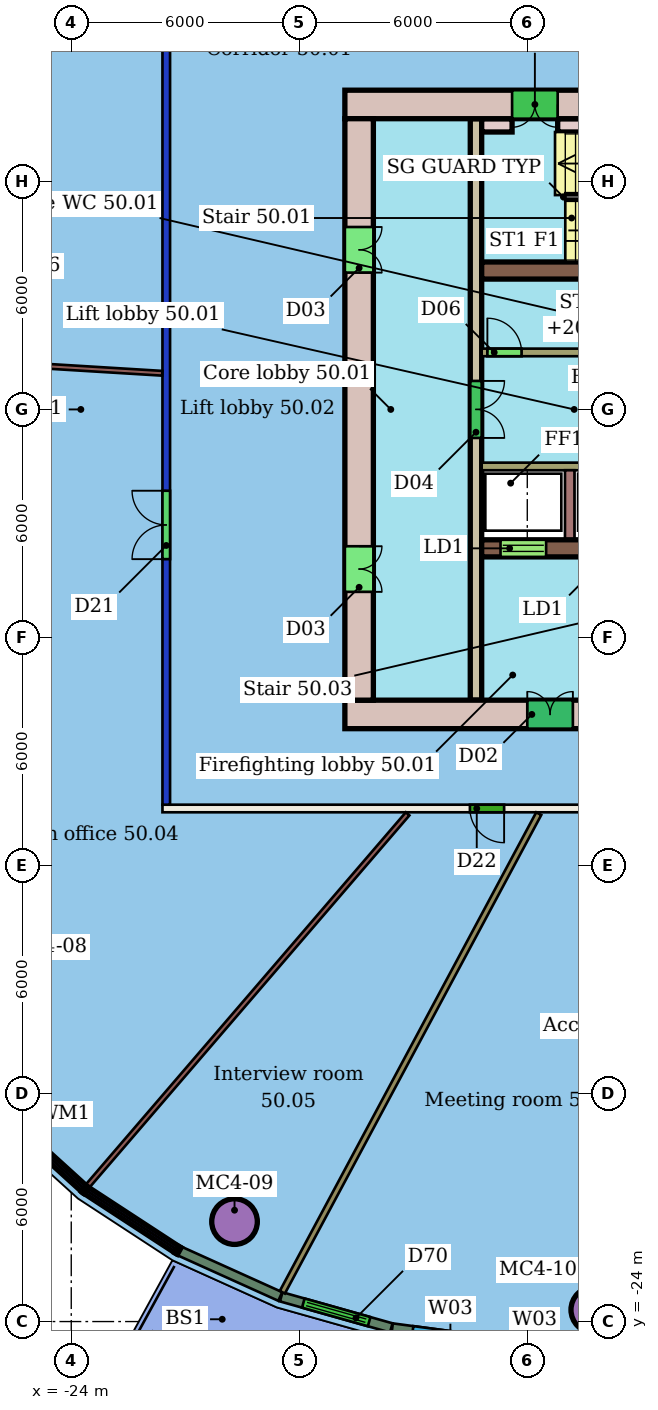
"""IFC4 building model, lengths in metres.
Left out: names, types, materials, properties, quantities, classifications, styles, units other than length and angle.
Written with IfcOpenShell. Run it as: python <this file> out.ifc"""

import sys

from ifc_helpers import new_model, si_unit, direction, frame, frame_2d, origin, origin_2d, place, context, subcontext, project, spatial, rectangle, hollow_circle, extrude, element, fill, save


model = new_model("IFC4")
c1 = context("Model", 3, precision=1e-05, world=origin(), true_north=direction((0.0, 1.0)))
c2 = subcontext(c1, "Body", "Model", "MODEL_VIEW")
j1 = project(units=[si_unit("LENGTHUNIT", "METRE"), si_unit("PLANEANGLEUNIT", "RADIAN")], contexts=[c1])
p1 = place(None, origin())
s1 = spatial("IfcSite", under=j1, at=p1, CompositionType="ELEMENT")
p2 = place(p1, origin())
s2 = spatial("IfcBuilding", under=s1, at=p2, CompositionType="ELEMENT")
p3 = place(p2, frame((0.0, 0.0, 206.5)))
s3 = spatial("IfcBuildingStorey", under=s2, at=p3, CompositionType="ELEMENT", Elevation=206.5)
for number, where, z_axis, x_axis in (
    (1, (-19.704, -21.37, 0.0), (0.0, 0.0, 1.0), (1.0, 0.0, 0.0)),
    (2, (-10.25, -23.691, 0.0), (0.0, 0.0, 1.0), (1.0, 0.0, 0.0)),
):
    element("IfcColumn", number, at=place(p3, frame(where, z_axis=z_axis, x_axis=x_axis)), inside=s3, PredefinedType="COLUMN", context=c2, shape_type="SweptSolid", body=[
        extrude(hollow_circle(Radius=0.6, WallThickness=0.045, at=origin_2d()), origin(), (0.0, 0.0, 1.0), 3.45),
    ])
p4 = place(p3, frame((9.6, -10.5, 0.0), z_axis=(0.0, 0.0, 1.0), x_axis=(-1.0, 0.0, 0.0)))
e3 = element("IfcWall", 3, at=p4, inside=s3, PredefinedType="PARTITIONING", context=c2, shape_type="SweptSolid", body=[
    extrude(rectangle(XDim=31.2, YDim=0.2, at=frame_2d((15.6, 0.0))), origin(), (0.0, 0.0, 1.0), 3.45),
])
p5 = place(p4, frame((22.21, 0.0, 0.0)))
e4 = element("IfcOpeningElement", 4, at=p5, cuts=e3, PredefinedType="OPENING", context=c2, shape_type="SweptSolid", body=[
    extrude(rectangle(XDim=0.9, YDim=2.1, at=frame_2d((0.45, 1.05))), frame((0.0, 0.11, 0.0), z_axis=(0.0, -1.0, 0.0), x_axis=(1.0, 0.0, 0.0)), (0.0, 0.0, 1.0), 0.22),
])
p6 = place(p4, frame((19.173, 0.0, 0.0)))
e5 = element("IfcOpeningElement", 5, at=p6, cuts=e3, PredefinedType="OPENING", context=c2, shape_type="SweptSolid", body=[
    extrude(rectangle(XDim=0.9, YDim=2.1, at=frame_2d((0.45, 1.05))), frame((0.0, 0.11, 0.0), z_axis=(0.0, -1.0, 0.0), x_axis=(1.0, 0.0, 0.0)), (0.0, 0.0, 1.0), 0.22),
])
p7 = place(p4, frame((8.72, 0.0, 0.0)))
e6 = element("IfcOpeningElement", 6, at=p7, cuts=e3, PredefinedType="OPENING", context=c2, shape_type="SweptSolid", body=[
    extrude(rectangle(XDim=1.8, YDim=2.4, at=frame_2d((0.9, 1.2))), frame((0.0, 0.11, 0.0), z_axis=(0.0, -1.0, 0.0), x_axis=(1.0, 0.0, 0.0)), (0.0, 0.0, 1.0), 0.22),
])
p8 = place(p4, frame((3.052, 0.0, 0.0)))
e7 = element("IfcOpeningElement", 7, at=p8, cuts=e3, PredefinedType="OPENING", context=c2, shape_type="SweptSolid", body=[
    extrude(rectangle(XDim=1.0, YDim=2.4, at=frame_2d((0.5, 1.2))), frame((0.0, 0.11, 0.0), z_axis=(0.0, -1.0, 0.0), x_axis=(1.0, 0.0, 0.0)), (0.0, 0.0, 1.0), 0.22),
])
p9 = place(p3, frame((-21.5, -10.4, 0.0), z_axis=(0.0, 0.0, 1.0), x_axis=(0.0, 1.0, 0.0)))
e8 = element("IfcWall", 8, at=p9, inside=s3, PredefinedType="PARTITIONING", context=c2, shape_type="SweptSolid", body=[
    extrude(rectangle(XDim=20.8, YDim=0.2, at=frame_2d((10.4, 0.0))), origin(), (0.0, 0.0, 1.0), 3.05),
])
p10 = place(p9, frame((6.461, 0.0, 0.0)))
e9 = element("IfcOpeningElement", 9, at=p10, cuts=e8, PredefinedType="OPENING", context=c2, shape_type="SweptSolid", body=[
    extrude(rectangle(XDim=1.8, YDim=2.1, at=frame_2d((0.9, 1.05))), frame((0.0, 0.11, 0.0), z_axis=(0.0, -1.0, 0.0), x_axis=(1.0, 0.0, 0.0)), (0.0, 0.0, 1.0), 0.22),
])
p11 = place(p3, frame((-29.979, 1.462, 0.0), z_axis=(0.0, 0.0, 1.0), x_axis=(0.998147297747, -0.060843832889, 0.0)))
e10 = element("IfcWall", 10, at=p11, inside=s3, PredefinedType="PARTITIONING", context=c2, shape_type="SweptSolid", body=[
    extrude(rectangle(XDim=8.39, YDim=0.125, at=frame_2d((4.195, 0.0))), origin(), (0.0, 0.0, 1.0), 3.45),
])
p12 = place(p3, frame((-23.564, -20.427, 0.0), z_axis=(0.0, 0.0, 1.0), x_axis=(0.651952710233, 0.758259628109, 0.0)))
e11 = element("IfcWall", 11, at=p12, inside=s3, PredefinedType="PARTITIONING", context=c2, shape_type="SweptSolid", body=[
    extrude(rectangle(XDim=12.907, YDim=0.125, at=frame_2d((6.453, 0.0))), origin(), (0.0, 0.0, 1.0), 3.45),
])
p13 = place(p3, frame((-18.445, -23.228, 0.0), z_axis=(0.0, 0.0, 1.0), x_axis=(0.472259350385, 0.881459645119, 0.0)))
e12 = element("IfcWall", 12, at=p13, inside=s3, PredefinedType="PARTITIONING", context=c2, shape_type="SweptSolid", body=[
    extrude(rectangle(XDim=14.286, YDim=0.15, at=frame_2d((7.143, 0.0))), origin(), (0.0, 0.0, 1.0), 3.45),
])
p14 = place(p3, frame((-21.144, -22.147, 0.0), z_axis=(0.0, 0.0, 1.0), x_axis=(0.91141845893, -0.411480731897, 0.0)))
e13 = element("IfcWall", 13, at=p14, inside=s3, PredefinedType="SOLIDWALL", context=c2, shape_type="SweptSolid", body=[
    extrude(rectangle(XDim=2.901, YDim=0.25, at=frame_2d((1.45, 0.0))), origin(), (0.0, 0.0, 1.0), 3.1),
])
p15 = place(p3, frame((-18.475, -23.349, 0.0), z_axis=(0.0, 0.0, 1.0), x_axis=(0.962400743331, -0.271633593717, 0.0)))
e14 = element("IfcWall", 14, at=p15, inside=s3, PredefinedType="SOLIDWALL", context=c2, shape_type="SweptSolid", body=[
    extrude(rectangle(XDim=3.009, YDim=0.25, at=frame_2d((1.504, 0.0))), origin(), (0.0, 0.0, 1.0), 3.1),
])
p16 = place(p15, frame((0.604, 0.0, 0.0)))
e15 = element("IfcOpeningElement", 15, at=p16, cuts=e14, PredefinedType="OPENING", context=c2, shape_type="SweptSolid", body=[
    extrude(rectangle(XDim=1.8, YDim=2.4, at=frame_2d((0.9, 1.2))), frame((0.0, 0.135, 0.0), z_axis=(0.0, -1.0, 0.0), x_axis=(1.0, 0.0, 0.0)), (0.0, 0.0, 1.0), 0.27),
])
p17 = place(p3, frame((-15.554, -24.172, 0.0), z_axis=(0.0, 0.0, 1.0), x_axis=(0.99120717839, -0.132319044388, 0.0)))
e16 = element("IfcWall", 16, at=p17, inside=s3, PredefinedType="SOLIDWALL", context=c2, shape_type="SweptSolid", body=[
    extrude(rectangle(XDim=3.089, YDim=0.25, at=frame_2d((1.544, 0.0))), origin(), (0.0, 0.0, 1.0), 3.1),
])
p18 = place(p17, frame((0.544, 0.0, 0.9)))
e17 = element("IfcOpeningElement", 17, at=p18, cuts=e16, PredefinedType="OPENING", context=c2, shape_type="SweptSolid", body=[
    extrude(rectangle(XDim=2.0, YDim=2.1, at=frame_2d((1.0, 1.05))), frame((0.0, 0.135, 0.0), z_axis=(0.0, -1.0, 0.0), x_axis=(1.0, 0.0, 0.0)), (0.0, 0.0, 1.0), 0.27),
])
p19 = place(p3, frame((-6.0, 8.025, 0.0), z_axis=(0.0, 0.0, 1.0), x_axis=(-1.0, 0.0, 0.0)))
e18 = element("IfcWall", 18, at=p19, inside=s3, PredefinedType="SHEAR", context=c2, shape_type="SweptSolid", body=[
    extrude(rectangle(XDim=10.8, YDim=0.75, at=frame_2d((5.4, 0.0))), origin(), (0.0, 0.0, 1.0), 3.3),
])
p20 = place(p19, frame((5.2, 0.0, 0.0)))
e19 = element("IfcOpeningElement", 19, at=p20, cuts=e18, PredefinedType="OPENING", context=c2, shape_type="SweptSolid", body=[
    extrude(rectangle(XDim=1.2, YDim=2.1, at=frame_2d((0.6, 1.05))), frame((0.0, 0.385, 0.0), z_axis=(0.0, -1.0, 0.0), x_axis=(1.0, 0.0, 0.0)), (0.0, 0.0, 1.0), 0.77),
])
p21 = place(p3, frame((-16.8, -8.025, 0.0), z_axis=(0.0, 0.0, 1.0), x_axis=(1.0, 0.0, 0.0)))
e20 = element("IfcWall", 20, at=p21, inside=s3, PredefinedType="SHEAR", context=c2, shape_type="SweptSolid", body=[
    extrude(rectangle(XDim=21.6, YDim=0.75, at=frame_2d((10.8, 0.0))), origin(), (0.0, 0.0, 1.0), 3.3),
])
p22 = place(p21, frame((4.8, 0.0, 0.0)))
e21 = element("IfcOpeningElement", 21, at=p22, cuts=e20, PredefinedType="OPENING", context=c2, shape_type="SweptSolid", body=[
    extrude(rectangle(XDim=1.2, YDim=2.1, at=frame_2d((0.6, 1.05))), frame((0.0, 0.385, 0.0), z_axis=(0.0, -1.0, 0.0), x_axis=(1.0, 0.0, 0.0)), (0.0, 0.0, 1.0), 0.77),
])
p23 = place(p3, frame((-16.425, 7.65, 0.0), z_axis=(0.0, 0.0, 1.0), x_axis=(0.0, -1.0, 0.0)))
e22 = element("IfcWall", 22, at=p23, inside=s3, PredefinedType="SHEAR", context=c2, shape_type="SweptSolid", body=[
    extrude(rectangle(XDim=15.3, YDim=0.75, at=frame_2d((7.65, 0.0))), origin(), (0.0, 0.0, 1.0), 3.3),
])
p24 = place(p23, frame((11.25, 0.0, 0.0)))
e23 = element("IfcOpeningElement", 23, at=p24, cuts=e22, PredefinedType="OPENING", context=c2, shape_type="SweptSolid", body=[
    extrude(rectangle(XDim=1.2, YDim=2.1, at=frame_2d((0.6, 1.05))), frame((0.0, 0.385, 0.0), z_axis=(0.0, -1.0, 0.0), x_axis=(1.0, 0.0, 0.0)), (0.0, 0.0, 1.0), 0.77),
])
p25 = place(p23, frame((2.85, 0.0, 0.0)))
e24 = element("IfcOpeningElement", 24, at=p25, cuts=e22, PredefinedType="OPENING", context=c2, shape_type="SweptSolid", body=[
    extrude(rectangle(XDim=1.2, YDim=2.1, at=frame_2d((0.6, 1.05))), frame((0.0, 0.385, 0.0), z_axis=(0.0, -1.0, 0.0), x_axis=(1.0, 0.0, 0.0)), (0.0, 0.0, 1.0), 0.77),
])
p26 = place(p3, frame((-13.2, 3.655, 0.0), z_axis=(0.0, 0.0, 1.0), x_axis=(1.0, 0.0, 0.0)))
e25 = element("IfcWall", 25, at=p26, inside=s3, PredefinedType="SHEAR", context=c2, shape_type="SweptSolid", body=[
    extrude(rectangle(XDim=7.2, YDim=0.45, at=frame_2d((3.6, 0.0))), origin(), (0.0, 0.0, 1.0), 3.3),
])
p27 = place(p3, frame((-13.2, -3.655, 0.0), z_axis=(0.0, 0.0, 1.0), x_axis=(1.0, 0.0, 0.0)))
e26 = element("IfcWall", 26, at=p27, inside=s3, PredefinedType="SHEAR", context=c2, shape_type="SweptSolid", body=[
    extrude(rectangle(XDim=7.2, YDim=0.45, at=frame_2d((3.6, 0.0))), origin(), (0.0, 0.0, 1.0), 3.3),
])
p28 = place(p27, frame((0.496, 0.0, 0.0)))
e27 = element("IfcOpeningElement", 27, at=p28, cuts=e26, PredefinedType="OPENING", context=c2, shape_type="SweptSolid", body=[
    extrude(rectangle(XDim=1.2, YDim=2.1, at=frame_2d((0.6, 1.05))), frame((0.0, 0.235, 0.0), z_axis=(0.0, -1.0, 0.0), x_axis=(1.0, 0.0, 0.0)), (0.0, 0.0, 1.0), 0.47),
])
p29 = place(p27, frame((2.938, 0.0, 0.0)))
e28 = element("IfcOpeningElement", 28, at=p29, cuts=e26, PredefinedType="OPENING", context=c2, shape_type="SweptSolid", body=[
    extrude(rectangle(XDim=1.2, YDim=2.1, at=frame_2d((0.6, 1.05))), frame((0.0, 0.235, 0.0), z_axis=(0.0, -1.0, 0.0), x_axis=(1.0, 0.0, 0.0)), (0.0, 0.0, 1.0), 0.47),
])
p30 = place(p3, frame((-13.35, 7.65, 0.0), z_axis=(0.0, 0.0, 1.0), x_axis=(0.0, -1.0, 0.0)))
e29 = element("IfcWall", 29, at=p30, inside=s3, PredefinedType="SHEAR", context=c2, shape_type="SweptSolid", body=[
    extrude(rectangle(XDim=15.3, YDim=0.3, at=frame_2d((7.65, 0.0))), origin(), (0.0, 0.0, 1.0), 3.3),
])
p31 = place(p30, frame((6.9, 0.0, 0.0)))
e30 = element("IfcOpeningElement", 30, at=p31, cuts=e29, PredefinedType="OPENING", context=c2, shape_type="SweptSolid", body=[
    extrude(rectangle(XDim=1.5, YDim=2.1, at=frame_2d((0.75, 1.05))), frame((0.0, 0.16, 0.0), z_axis=(0.0, -1.0, 0.0), x_axis=(1.0, 0.0, 0.0)), (0.0, 0.0, 1.0), 0.32),
])
p32 = place(p3, frame((-13.2, 1.5, 0.0), z_axis=(0.0, 0.0, 1.0), x_axis=(1.0, 0.0, 0.0)))
e31 = element("IfcWall", 31, at=p32, inside=s3, PredefinedType="SHEAR", context=c2, shape_type="SweptSolid", body=[
    extrude(rectangle(XDim=14.4, YDim=0.2, at=frame_2d((7.2, 0.0))), origin(), (0.0, 0.0, 1.0), 3.3),
])
p33 = place(p32, frame((10.312, 0.0, 0.0)))
e32 = element("IfcOpeningElement", 32, at=p33, cuts=e31, PredefinedType="OPENING", context=c2, shape_type="SweptSolid", body=[
    extrude(rectangle(XDim=1.1, YDim=2.1, at=frame_2d((0.55, 1.05))), frame((0.0, 0.11, 0.0), z_axis=(0.0, -1.0, 0.0), x_axis=(1.0, 0.0, 0.0)), (0.0, 0.0, 1.0), 0.22),
])
p34 = place(p32, frame((12.754, 0.0, 0.0)))
e33 = element("IfcOpeningElement", 33, at=p34, cuts=e31, PredefinedType="OPENING", context=c2, shape_type="SweptSolid", body=[
    extrude(rectangle(XDim=1.1, YDim=2.1, at=frame_2d((0.55, 1.05))), frame((0.0, 0.11, 0.0), z_axis=(0.0, -1.0, 0.0), x_axis=(1.0, 0.0, 0.0)), (0.0, 0.0, 1.0), 0.22),
])
p35 = place(p32, frame((0.15, 0.0, 0.0)))
e34 = element("IfcOpeningElement", 34, at=p35, cuts=e31, PredefinedType="OPENING", context=c2, shape_type="SweptSolid", body=[
    extrude(rectangle(XDim=0.9, YDim=2.1, at=frame_2d((0.45, 1.05))), frame((0.0, 0.11, 0.0), z_axis=(0.0, -1.0, 0.0), x_axis=(1.0, 0.0, 0.0)), (0.0, 0.0, 1.0), 0.22),
])
p36 = place(p32, frame((4.983, 0.0, 0.0)))
e35 = element("IfcOpeningElement", 35, at=p36, cuts=e31, PredefinedType="OPENING", context=c2, shape_type="SweptSolid", body=[
    extrude(rectangle(XDim=0.9, YDim=2.1, at=frame_2d((0.45, 1.05))), frame((0.0, 0.11, 0.0), z_axis=(0.0, -1.0, 0.0), x_axis=(1.0, 0.0, 0.0)), (0.0, 0.0, 1.0), 0.22),
])
p37 = place(p3, frame((1.2, -1.5, 0.0), z_axis=(0.0, 0.0, 1.0), x_axis=(-1.0, 0.0, 0.0)))
e36 = element("IfcWall", 36, at=p37, inside=s3, PredefinedType="SHEAR", context=c2, shape_type="SweptSolid", body=[
    extrude(rectangle(XDim=14.4, YDim=0.2, at=frame_2d((7.2, 0.0))), origin(), (0.0, 0.0, 1.0), 3.3),
])
p38 = place(p37, frame((7.821, 0.0, 0.0)))
e37 = element("IfcOpeningElement", 37, at=p38, cuts=e36, PredefinedType="OPENING", context=c2, shape_type="SweptSolid", body=[
    extrude(rectangle(XDim=1.2, YDim=2.1, at=frame_2d((0.6, 1.05))), frame((0.0, 0.11, 0.0), z_axis=(0.0, -1.0, 0.0), x_axis=(1.0, 0.0, 0.0)), (0.0, 0.0, 1.0), 0.22),
])
p39 = place(p37, frame((0.546, 0.0, 0.0)))
e38 = element("IfcOpeningElement", 38, at=p39, cuts=e36, PredefinedType="OPENING", context=c2, shape_type="SweptSolid", body=[
    extrude(rectangle(XDim=1.1, YDim=2.1, at=frame_2d((0.55, 1.05))), frame((0.0, 0.11, 0.0), z_axis=(0.0, -1.0, 0.0), x_axis=(1.0, 0.0, 0.0)), (0.0, 0.0, 1.0), 0.22),
])
p40 = place(p37, frame((4.983, 0.0, 0.0)))
e39 = element("IfcOpeningElement", 39, at=p40, cuts=e36, PredefinedType="OPENING", context=c2, shape_type="SweptSolid", body=[
    extrude(rectangle(XDim=1.0, YDim=2.1, at=frame_2d((0.5, 1.05))), frame((0.0, 0.11, 0.0), z_axis=(0.0, -1.0, 0.0), x_axis=(1.0, 0.0, 0.0)), (0.0, 0.0, 1.0), 0.22),
])
p41 = place(p37, frame((2.592, 0.0, 0.0)))
e40 = element("IfcOpeningElement", 40, at=p41, cuts=e36, PredefinedType="OPENING", context=c2, shape_type="SweptSolid", body=[
    extrude(rectangle(XDim=1.0, YDim=2.1, at=frame_2d((0.5, 1.05))), frame((0.0, 0.11, 0.0), z_axis=(0.0, -1.0, 0.0), x_axis=(1.0, 0.0, 0.0)), (0.0, 0.0, 1.0), 0.22),
])
p42 = place(p3, frame((-13.2, 7.475, 0.0), z_axis=(0.0, 0.0, 1.0), x_axis=(1.0, 0.0, 0.0)))
e41 = element("IfcWall", 41, at=p42, inside=s3, PredefinedType="SHEAR", context=c2, shape_type="SweptSolid", body=[
    extrude(rectangle(XDim=0.8, YDim=0.35, at=frame_2d((0.4, 0.0))), origin(), (0.0, 0.0, 1.0), 3.3),
])
p43 = place(p3, frame((-11.2, 7.475, 0.0), z_axis=(0.0, 0.0, 1.0), x_axis=(1.0, 0.0, 0.0)))
e42 = element("IfcWall", 42, at=p43, inside=s3, PredefinedType="SHEAR", context=c2, shape_type="SweptSolid", body=[
    extrude(rectangle(XDim=5.05, YDim=0.35, at=frame_2d((2.525, 0.0))), origin(), (0.0, 0.0, 1.0), 3.3),
])
p44 = place(p3, frame((-10.883, -1.6, 0.0), z_axis=(0.0, 0.0, 1.0), x_axis=(0.0, -1.0, 0.0)))
e43 = element("IfcWall", 43, at=p44, inside=s3, PredefinedType="SHEAR", context=c2, shape_type="SweptSolid", body=[
    extrude(rectangle(XDim=1.83, YDim=0.25, at=frame_2d((0.915, 0.0))), origin(), (0.0, 0.0, 1.0), 3.3),
])
p45 = place(p10, origin())
e44 = element("IfcDoor", 44, at=p45, inside=s3, OperationType="DOUBLE_DOOR_SINGLE_SWING", PredefinedType="DOOR", context=c2, shape_type="SweptSolid", body=[
    extrude(rectangle(XDim=1.8, YDim=2.1, at=frame_2d((0.9, 1.05))), frame((0.0, 0.025, 0.0), z_axis=(0.0, -1.0, 0.0), x_axis=(1.0, 0.0, 0.0)), (0.0, 0.0, 1.0), 0.05),
])
fill(e9, e44)
p46 = place(p5, origin())
e45 = element("IfcDoor", 45, at=p46, inside=s3, OperationType="SINGLE_SWING_LEFT", PredefinedType="DOOR", context=c2, shape_type="SweptSolid", body=[
    extrude(rectangle(XDim=0.9, YDim=2.1, at=frame_2d((0.45, 1.05))), frame((0.0, 0.025, 0.0), z_axis=(0.0, -1.0, 0.0), x_axis=(1.0, 0.0, 0.0)), (0.0, 0.0, 1.0), 0.05),
])
fill(e4, e45)
p47 = place(p16, origin())
e46 = element("IfcDoor", 46, at=p47, inside=s3, OperationType="DOUBLE_DOOR_SLIDING", PredefinedType="DOOR", context=c2, shape_type="SweptSolid", body=[
    extrude(rectangle(XDim=1.8, YDim=2.4, at=frame_2d((0.9, 1.2))), frame((0.0, 0.025, 0.0), z_axis=(0.0, -1.0, 0.0), x_axis=(1.0, 0.0, 0.0)), (0.0, 0.0, 1.0), 0.05),
])
fill(e15, e46)
p48 = place(p18, origin())
e47 = element("IfcWindow", 47, at=p48, inside=s3, PartitioningType="SINGLE_PANEL", PredefinedType="WINDOW", context=c2, shape_type="SweptSolid", body=[
    extrude(rectangle(XDim=2.0, YDim=2.1, at=frame_2d((1.0, 1.05))), frame((0.0, 0.03, 0.0), z_axis=(0.0, -1.0, 0.0), x_axis=(1.0, 0.0, 0.0)), (0.0, 0.0, 1.0), 0.06),
])
fill(e17, e47)
p49 = place(p20, origin())
e48 = element("IfcDoor", 48, at=p49, inside=s3, OperationType="DOUBLE_DOOR_SINGLE_SWING", PredefinedType="NOTDEFINED", context=c2, shape_type="SweptSolid", body=[
    extrude(rectangle(XDim=1.2, YDim=2.1, at=frame_2d((0.6, 1.05))), frame((0.0, 0.025, 0.0), z_axis=(0.0, -1.0, 0.0), x_axis=(1.0, 0.0, 0.0)), (0.0, 0.0, 1.0), 0.05),
])
fill(e19, e48)
p50 = place(p22, origin())
e49 = element("IfcDoor", 49, at=p50, inside=s3, OperationType="DOUBLE_DOOR_SINGLE_SWING", PredefinedType="NOTDEFINED", context=c2, shape_type="SweptSolid", body=[
    extrude(rectangle(XDim=1.2, YDim=2.1, at=frame_2d((0.6, 1.05))), frame((0.0, 0.025, 0.0), z_axis=(0.0, -1.0, 0.0), x_axis=(1.0, 0.0, 0.0)), (0.0, 0.0, 1.0), 0.05),
])
fill(e21, e49)
p51 = place(p24, origin())
e50 = element("IfcDoor", 50, at=p51, inside=s3, OperationType="DOUBLE_DOOR_SINGLE_SWING", PredefinedType="NOTDEFINED", context=c2, shape_type="SweptSolid", body=[
    extrude(rectangle(XDim=1.2, YDim=2.1, at=frame_2d((0.6, 1.05))), frame((0.0, 0.025, 0.0), z_axis=(0.0, -1.0, 0.0), x_axis=(1.0, 0.0, 0.0)), (0.0, 0.0, 1.0), 0.05),
])
fill(e23, e50)
p52 = place(p25, origin())
e51 = element("IfcDoor", 51, at=p52, inside=s3, OperationType="DOUBLE_DOOR_SINGLE_SWING", PredefinedType="NOTDEFINED", context=c2, shape_type="SweptSolid", body=[
    extrude(rectangle(XDim=1.2, YDim=2.1, at=frame_2d((0.6, 1.05))), frame((0.0, 0.025, 0.0), z_axis=(0.0, -1.0, 0.0), x_axis=(1.0, 0.0, 0.0)), (0.0, 0.0, 1.0), 0.05),
])
fill(e24, e51)
p53 = place(p28, origin())
e52 = element("IfcDoor", 52, at=p53, inside=s3, OperationType="DOUBLE_DOOR_SLIDING", PredefinedType="NOTDEFINED", context=c2, shape_type="SweptSolid", body=[
    extrude(rectangle(XDim=1.2, YDim=2.1, at=frame_2d((0.6, 1.05))), frame((0.0, 0.025, 0.0), z_axis=(0.0, -1.0, 0.0), x_axis=(1.0, 0.0, 0.0)), (0.0, 0.0, 1.0), 0.05),
])
fill(e27, e52)
p54 = place(p31, origin())
e53 = element("IfcDoor", 53, at=p54, inside=s3, OperationType="DOUBLE_DOOR_SINGLE_SWING", PredefinedType="NOTDEFINED", context=c2, shape_type="SweptSolid", body=[
    extrude(rectangle(XDim=1.5, YDim=2.1, at=frame_2d((0.75, 1.05))), frame((0.0, 0.025, 0.0), z_axis=(0.0, -1.0, 0.0), x_axis=(1.0, 0.0, 0.0)), (0.0, 0.0, 1.0), 0.05),
])
fill(e30, e53)
p55 = place(p35, origin())
e54 = element("IfcDoor", 54, at=p55, inside=s3, OperationType="SINGLE_SWING_LEFT", PredefinedType="NOTDEFINED", context=c2, shape_type="SweptSolid", body=[
    extrude(rectangle(XDim=0.9, YDim=2.1, at=frame_2d((0.45, 1.05))), frame((0.0, 0.025, 0.0), z_axis=(0.0, -1.0, 0.0), x_axis=(1.0, 0.0, 0.0)), (0.0, 0.0, 1.0), 0.05),
])
fill(e34, e54)
save(model, sys.argv[1])
